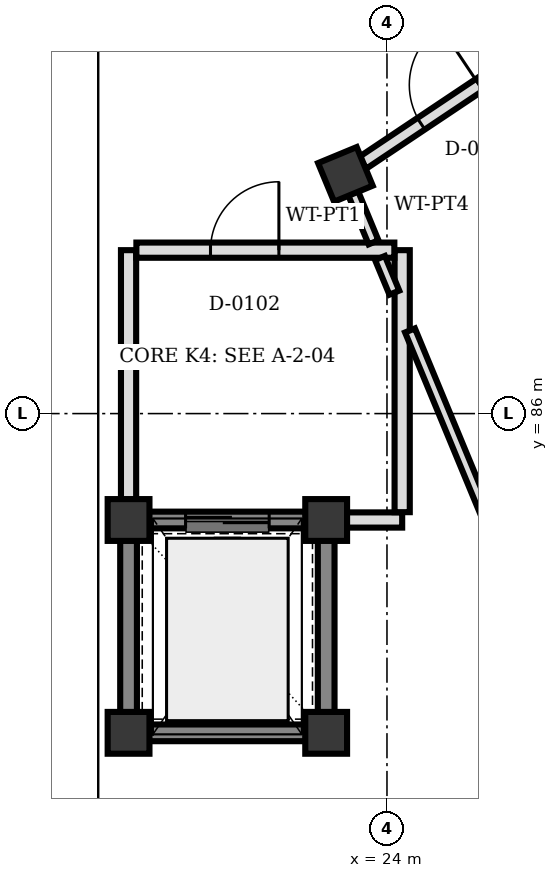
"""IFC4 building model, lengths in metres.
Left out: names, types, materials, properties, quantities, classifications, styles, units other than length and angle.
Written with IfcOpenShell. Run it as: python <this file> out.ifc"""

import sys

from ifc_helpers import new_model, si_unit, direction, frame, frame_2d, origin, origin_2d, place, context, subcontext, project, spatial, rectangle, extrude, element, fill, save


model = new_model("IFC4")
c1 = context("Model", 3, precision=1e-05, world=origin(), true_north=direction((0.0, 1.0)))
c2 = subcontext(c1, "Body", "Model", "MODEL_VIEW")
j1 = project(units=[si_unit("LENGTHUNIT", "METRE"), si_unit("PLANEANGLEUNIT", "RADIAN")], contexts=[c1])
p1 = place(None, origin())
s1 = spatial("IfcSite", under=j1, at=p1, CompositionType="ELEMENT")
p2 = place(p1, origin())
s2 = spatial("IfcBuilding", under=s1, at=p2, CompositionType="ELEMENT")
p3 = place(p2, frame((0.0, 0.0, 4.5)))
s3 = spatial("IfcBuildingStorey", under=s2, at=p3, CompositionType="ELEMENT", Elevation=4.5)
for number, where, z_axis, x_axis in (
    (1, (20.6, 81.8, 0.0), (0.0, 0.0, 1.0), (1.0, 0.0, 0.0)),
    (2, (23.2, 81.8, 0.0), (0.0, 0.0, 1.0), (1.0, 0.0, 0.0)),
    (3, (23.2, 84.6, 0.0), (0.0, 0.0, 1.0), (1.0, 0.0, 0.0)),
    (4, (20.6, 84.6, 0.0), (0.0, 0.0, 1.0), (1.0, 0.0, 0.0)),
    (5, (23.453, 89.147, 0.0), (0.0, 0.0, 1.0), (0.383, -0.924, 0.0)),
):
    element("IfcColumn", number, at=place(p3, frame(where, z_axis=z_axis, x_axis=x_axis)), inside=s3, PredefinedType="COLUMN", context=c2, shape_type="SweptSolid", body=[
        extrude(rectangle(XDim=0.55, YDim=0.55, at=origin_2d()), origin(), (0.0, 0.0, 1.0), 4.0),
    ])
p4 = place(p3, frame((20.867, 81.8, 0.0), z_axis=(0.0, 0.0, 1.0), x_axis=(1.0, 0.0, 0.0)))
e6 = element("IfcWall", 6, at=p4, inside=s3, PredefinedType="SHEAR", context=c2, shape_type="SweptSolid", body=[
    extrude(rectangle(XDim=2.066, YDim=0.22, at=frame_2d((1.033, 0.0))), origin(), (0.0, 0.0, 1.0), 3.74),
])
p5 = place(p3, frame((23.2, 82.067, 0.0), z_axis=(0.0, 0.0, 1.0), x_axis=(0.0, 1.0, 0.0)))
e7 = element("IfcWall", 7, at=p5, inside=s3, PredefinedType="SHEAR", context=c2, shape_type="SweptSolid", body=[
    extrude(rectangle(XDim=2.266, YDim=0.22, at=frame_2d((1.133, 0.0))), origin(), (0.0, 0.0, 1.0), 3.74),
])
p6 = place(p3, frame((22.933, 84.6, 0.0), z_axis=(0.0, 0.0, 1.0), x_axis=(-1.0, 0.0, 0.0)))
e8 = element("IfcWall", 8, at=p6, inside=s3, PredefinedType="SHEAR", context=c2, shape_type="SweptSolid", body=[
    extrude(rectangle(XDim=2.066, YDim=0.22, at=frame_2d((1.033, 0.0))), origin(), (0.0, 0.0, 1.0), 3.74),
])
p7 = place(p6, frame((0.483, 0.0, 0.0)))
e9 = element("IfcOpeningElement", 9, at=p7, cuts=e8, PredefinedType="OPENING", context=c2, shape_type="SweptSolid", body=[
    extrude(rectangle(XDim=1.1, YDim=2.15, at=frame_2d((0.55, 1.075))), frame((0.0, 0.12, 0.0), z_axis=(0.0, -1.0, 0.0), x_axis=(1.0, 0.0, 0.0)), (0.0, 0.0, 1.0), 0.24),
])
p8 = place(p3, frame((20.6, 84.333, 0.0), z_axis=(0.0, 0.0, 1.0), x_axis=(0.0, -1.0, 0.0)))
e10 = element("IfcWall", 10, at=p8, inside=s3, PredefinedType="SHEAR", context=c2, shape_type="SweptSolid", body=[
    extrude(rectangle(XDim=2.266, YDim=0.22, at=frame_2d((1.133, 0.0))), origin(), (0.0, 0.0, 1.0), 3.74),
])
p9 = place(p3, frame((23.467, 84.6, 0.0), z_axis=(0.0, 0.0, 1.0), x_axis=(1.0, 0.0, 0.0)))
e11 = element("IfcWall", 11, at=p9, inside=s3, PredefinedType="PARTITIONING", context=c2, shape_type="SweptSolid", body=[
    extrude(rectangle(XDim=0.733, YDim=0.2, at=frame_2d((0.366, 0.0))), origin(), (0.0, 0.0, 1.0), 3.7),
])
p10 = place(p3, frame((20.6, 84.867, 0.0), z_axis=(0.0, 0.0, 1.0), x_axis=(0.0, 1.0, 0.0)))
e12 = element("IfcWall", 12, at=p10, inside=s3, PredefinedType="PARTITIONING", context=c2, shape_type="SweptSolid", body=[
    extrude(rectangle(XDim=3.283, YDim=0.2, at=frame_2d((1.642, 0.0))), origin(), (0.0, 0.0, 1.0), 3.7),
])
p11 = place(p3, frame((24.2, 84.703, 0.0), z_axis=(0.0, 0.0, 1.0), x_axis=(0.0, 1.0, 0.0)))
e13 = element("IfcWall", 13, at=p11, inside=s3, PredefinedType="PARTITIONING", context=c2, shape_type="SweptSolid", body=[
    extrude(rectangle(XDim=3.447, YDim=0.2, at=frame_2d((1.724, 0.0))), origin(), (0.0, 0.0, 1.0), 3.072),
])
p12 = place(p3, frame((20.703, 88.15, 0.0), z_axis=(0.0, 0.0, 1.0), x_axis=(1.0, 0.0, 0.0)))
e14 = element("IfcWall", 14, at=p12, inside=s3, PredefinedType="PARTITIONING", context=c2, shape_type="SweptSolid", body=[
    extrude(rectangle(XDim=3.394, YDim=0.2, at=frame_2d((1.697, 0.0))), origin(), (0.0, 0.0, 1.0), 3.072),
])
p13 = place(p12, frame((0.975, 0.0, 0.0)))
e15 = element("IfcOpeningElement", 15, at=p13, cuts=e14, PredefinedType="OPENING", context=c2, shape_type="SweptSolid", body=[
    extrude(rectangle(XDim=0.9, YDim=2.2, at=frame_2d((0.45, 1.1))), frame((0.0, 0.11, 0.0), z_axis=(0.0, -1.0, 0.0), x_axis=(1.0, 0.0, 0.0)), (0.0, 0.0, 1.0), 0.22),
])
p14 = place(p3, frame((23.555, 88.9, 0.0), z_axis=(0.0, 0.0, 1.0), x_axis=(0.38278283439, -0.923838352579, 0.0)))
e16 = element("IfcWall", 16, at=p14, inside=s3, PredefinedType="PARTITIONING", context=c2, shape_type="SweptSolid", body=[
    extrude(rectangle(XDim=0.7, YDim=0.14, at=frame_2d((0.35, 0.0))), origin(), (0.0, 0.0, 1.0), 3.072),
])
p15 = place(p3, frame((23.908, 88.047, 0.0), z_axis=(0.0, 0.0, 1.0), x_axis=(0.3827885685, -0.92383597669, 0.0)))
e17 = element("IfcWall", 17, at=p15, inside=s3, PredefinedType="PARTITIONING", context=c2, shape_type="SweptSolid", body=[
    extrude(rectangle(XDim=0.494, YDim=0.14, at=frame_2d((0.247, 0.0))), origin(), (0.0, 0.0, 1.0), 3.072),
])
p16 = place(p3, frame((24.303, 87.094, 0.0), z_axis=(0.0, 0.0, 1.0), x_axis=(0.382682035927, -0.923880110934, 0.0)))
e18 = element("IfcWall", 18, at=p16, inside=s3, PredefinedType="PARTITIONING", context=c2, shape_type="SweptSolid", body=[
    extrude(rectangle(XDim=6.486, YDim=0.14, at=frame_2d((3.243, 0.0))), origin(), (0.0, 0.0, 1.0), 3.072),
])
p17 = place(p3, frame((23.679, 89.298, 0.0), z_axis=(0.0, 0.0, 1.0), x_axis=(0.831318045056, 0.555797002478, 0.0)))
e19 = element("IfcWall", 19, at=p17, inside=s3, PredefinedType="PARTITIONING", context=c2, shape_type="SweptSolid", body=[
    extrude(rectangle(XDim=2.773, YDim=0.18, at=frame_2d((1.386, 0.0))), origin(), (0.0, 0.0, 1.0), 3.072),
])
p18 = place(p17, frame((0.926, 0.0, 0.0)))
e20 = element("IfcOpeningElement", 20, at=p18, cuts=e19, PredefinedType="OPENING", context=c2, shape_type="SweptSolid", body=[
    extrude(rectangle(XDim=0.92, YDim=2.1, at=frame_2d((0.46, 1.05))), frame((0.0, 0.1, 0.0), z_axis=(0.0, -1.0, 0.0), x_axis=(1.0, 0.0, 0.0)), (0.0, 0.0, 1.0), 0.2),
])
p19 = place(p7, origin())
e21 = element("IfcDoor", 21, at=p19, inside=s3, OperationType="DOUBLE_DOOR_SLIDING", PredefinedType="DOOR", context=c2, shape_type="SweptSolid", body=[
    extrude(rectangle(XDim=1.1, YDim=2.15, at=frame_2d((0.55, 1.075))), frame((0.0, 0.025, 0.0), z_axis=(0.0, -1.0, 0.0), x_axis=(1.0, 0.0, 0.0)), (0.0, 0.0, 1.0), 0.05),
])
fill(e9, e21)
p20 = place(p13, origin())
e22 = element("IfcDoor", 22, at=p20, inside=s3, OperationType="SINGLE_SWING_RIGHT", PredefinedType="DOOR", context=c2, shape_type="SweptSolid", body=[
    extrude(rectangle(XDim=0.9, YDim=2.2, at=frame_2d((0.45, 1.1))), frame((0.0, 0.025, 0.0), z_axis=(0.0, -1.0, 0.0), x_axis=(1.0, 0.0, 0.0)), (0.0, 0.0, 1.0), 0.05),
])
fill(e15, e22)
p21 = place(p18, origin())
e23 = element("IfcDoor", 23, at=p21, inside=s3, OperationType="SINGLE_SWING_RIGHT", PredefinedType="DOOR", context=c2, shape_type="SweptSolid", body=[
    extrude(rectangle(XDim=0.92, YDim=2.1, at=frame_2d((0.46, 1.05))), frame((0.0, 0.025, 0.0), z_axis=(0.0, -1.0, 0.0), x_axis=(1.0, 0.0, 0.0)), (0.0, 0.0, 1.0), 0.05),
])
fill(e20, e23)
save(model, sys.argv[1])
